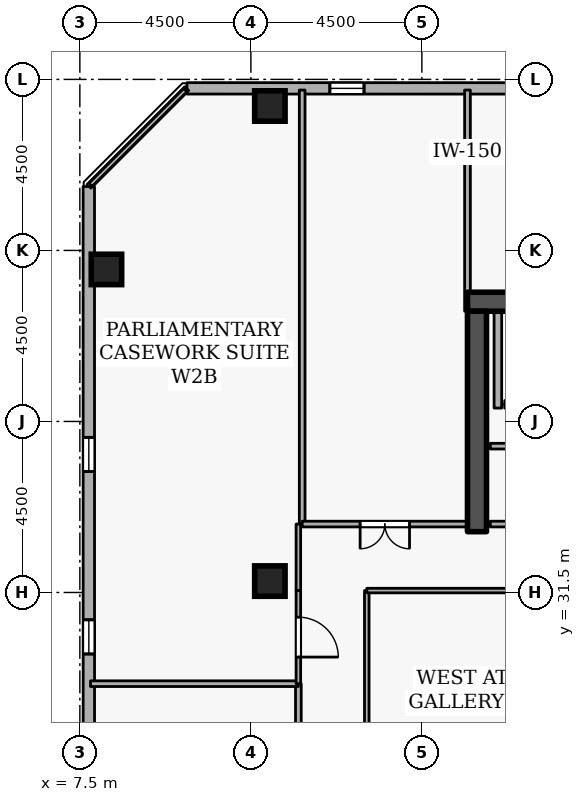
"""IFC4 building model, lengths in metres.
Left out: names, types, materials, properties, quantities, classifications, styles, units other than length and angle.
Written with IfcOpenShell. Run it as: python <this file> out.ifc"""

import sys

from ifc_helpers import new_model, si_unit, direction, frame, frame_2d, origin, origin_2d, place, context, subcontext, project, spatial, rectangle, extrude, element, fill, save


model = new_model("IFC4")
c1 = context("Model", 3, precision=1e-05, world=origin(), true_north=direction((0.0, 1.0)))
c2 = subcontext(c1, "Body", "Model", "MODEL_VIEW")
j1 = project(units=[si_unit("LENGTHUNIT", "METRE"), si_unit("PLANEANGLEUNIT", "RADIAN")], contexts=[c1])
p1 = place(None, origin())
s1 = spatial("IfcSite", under=j1, at=p1, CompositionType="ELEMENT")
p2 = place(p1, origin())
s2 = spatial("IfcBuilding", under=s1, at=p2, CompositionType="ELEMENT")
p3 = place(p2, frame((0.0, 0.0, 261.9)))
s3 = spatial("IfcBuildingStorey", under=s2, at=p3, CompositionType="ELEMENT", Elevation=261.9)
p4 = place(p3, frame((17.7, 39.15, 0.0), z_axis=(0.0, 0.0, 1.0), x_axis=(1.0, 0.0, 0.0)))
e1 = element("IfcWall", 1, at=p4, inside=s3, PredefinedType="SHEAR", context=c2, shape_type="SweptSolid", body=[
    extrude(rectangle(XDim=15.6, YDim=0.5, at=frame_2d((7.8, 0.0))), origin(), (0.0, 0.0, 1.0), 3.6),
])
p5 = place(p3, frame((17.95, 33.1, 0.0), z_axis=(0.0, 0.0, 1.0), x_axis=(0.0, 1.0, 0.0)))
e2 = element("IfcWall", 2, at=p5, inside=s3, PredefinedType="SHEAR", context=c2, shape_type="SweptSolid", body=[
    extrude(rectangle(XDim=5.8, YDim=0.5, at=frame_2d((2.9, 0.0))), origin(), (0.0, 0.0, 1.0), 3.6),
])
for number, where, z_axis, x_axis in (
    (3, (12.5, 44.3, 0.0), (0.0, 0.0, 1.0), (1.0, 0.0, 0.0)),
    (4, (8.2, 40.0, 0.0), (0.0, 0.0, 1.0), (1.0, 0.0, 0.0)),
    (5, (12.5, 31.8, 0.0), (0.0, 0.0, 1.0), (1.0, 0.0, 0.0)),
):
    element("IfcColumn", number, at=place(p3, frame(where, z_axis=z_axis, x_axis=x_axis)), inside=s3, PredefinedType="COLUMN", context=c2, shape_type="SweptSolid", body=[
        extrude(rectangle(XDim=0.8, YDim=0.8, at=origin_2d()), origin(), (0.0, 0.0, 1.0), 3.6),
    ])
p6 = place(p3, frame((45.578, 44.761, 0.0), z_axis=(0.0, 0.0, 1.0), x_axis=(-0.999999994606, 0.000103863011, 0.0)))
e6 = element("IfcWall", 6, at=p6, inside=s3, PredefinedType="STANDARD", context=c2, shape_type="SweptSolid", body=[
    extrude(rectangle(XDim=35.259, YDim=0.3, at=frame_2d((17.629, 0.0))), origin(), (0.0, 0.0, 1.0), 2.7),
])
p7 = place(p6, frame((1.8, 0.0, 0.72)))
e7 = element("IfcOpeningElement", 7, at=p7, cuts=e6, PredefinedType="OPENING", context=c2, shape_type="SweptSolid", body=[
    extrude(rectangle(XDim=0.9, YDim=1.75, at=frame_2d((0.45, 0.875))), frame((0.0, 0.16, 0.0), z_axis=(0.0, -1.0, 0.0), x_axis=(1.0, 0.0, 0.0)), (0.0, 0.0, 1.0), 0.32),
])
p8 = place(p6, frame((11.4, 0.0, 0.72)))
e8 = element("IfcOpeningElement", 8, at=p8, cuts=e6, PredefinedType="OPENING", context=c2, shape_type="SweptSolid", body=[
    extrude(rectangle(XDim=0.9, YDim=1.75, at=frame_2d((0.45, 0.875))), frame((0.0, 0.16, 0.0), z_axis=(0.0, -1.0, 0.0), x_axis=(1.0, 0.0, 0.0)), (0.0, 0.0, 1.0), 0.32),
])
p9 = place(p6, frame((16.2, 0.0, 0.72)))
e9 = element("IfcOpeningElement", 9, at=p9, cuts=e6, PredefinedType="OPENING", context=c2, shape_type="SweptSolid", body=[
    extrude(rectangle(XDim=0.9, YDim=1.75, at=frame_2d((0.45, 0.875))), frame((0.0, 0.16, 0.0), z_axis=(0.0, -1.0, 0.0), x_axis=(1.0, 0.0, 0.0)), (0.0, 0.0, 1.0), 0.32),
])
p10 = place(p6, frame((25.8, 0.0, 0.72)))
e10 = element("IfcOpeningElement", 10, at=p10, cuts=e6, PredefinedType="OPENING", context=c2, shape_type="SweptSolid", body=[
    extrude(rectangle(XDim=0.9, YDim=1.75, at=frame_2d((0.45, 0.875))), frame((0.0, 0.16, 0.0), z_axis=(0.0, -1.0, 0.0), x_axis=(1.0, 0.0, 0.0)), (0.0, 0.0, 1.0), 0.32),
])
p11 = place(p6, frame((30.6, 0.0, 0.72)))
e11 = element("IfcOpeningElement", 11, at=p11, cuts=e6, PredefinedType="OPENING", context=c2, shape_type="SweptSolid", body=[
    extrude(rectangle(XDim=0.9, YDim=1.75, at=frame_2d((0.45, 0.875))), frame((0.0, 0.16, 0.0), z_axis=(0.0, -1.0, 0.0), x_axis=(1.0, 0.0, 0.0)), (0.0, 0.0, 1.0), 0.32),
])
p12 = place(p3, frame((7.735, 42.181, 0.0), z_axis=(0.0, 0.0, 1.0), x_axis=(0.000103863011, -0.999999994606, 0.0)))
e12 = element("IfcWall", 12, at=p12, inside=s3, PredefinedType="STANDARD", context=c2, shape_type="SweptSolid", body=[
    extrude(rectangle(XDim=35.259, YDim=0.3, at=frame_2d((17.629, 0.0))), origin(), (0.0, 0.0, 1.0), 2.7),
])
p13 = place(p12, frame((6.6, 0.0, 0.72)))
e13 = element("IfcOpeningElement", 13, at=p13, cuts=e12, PredefinedType="OPENING", context=c2, shape_type="SweptSolid", body=[
    extrude(rectangle(XDim=0.9, YDim=1.75, at=frame_2d((0.45, 0.875))), frame((0.0, 0.16, 0.0), z_axis=(0.0, -1.0, 0.0), x_axis=(1.0, 0.0, 0.0)), (0.0, 0.0, 1.0), 0.32),
])
p14 = place(p12, frame((11.4, 0.0, 0.72)))
e14 = element("IfcOpeningElement", 14, at=p14, cuts=e12, PredefinedType="OPENING", context=c2, shape_type="SweptSolid", body=[
    extrude(rectangle(XDim=0.9, YDim=1.75, at=frame_2d((0.45, 0.875))), frame((0.0, 0.16, 0.0), z_axis=(0.0, -1.0, 0.0), x_axis=(1.0, 0.0, 0.0)), (0.0, 0.0, 1.0), 0.32),
])
p15 = place(p12, frame((21.0, 0.0, 0.72)))
e15 = element("IfcOpeningElement", 15, at=p15, cuts=e12, PredefinedType="OPENING", context=c2, shape_type="SweptSolid", body=[
    extrude(rectangle(XDim=0.9, YDim=1.75, at=frame_2d((0.45, 0.875))), frame((0.0, 0.16, 0.0), z_axis=(0.0, -1.0, 0.0), x_axis=(1.0, 0.0, 0.0)), (0.0, 0.0, 1.0), 0.32),
])
p16 = place(p12, frame((25.8, 0.0, 0.72)))
e16 = element("IfcOpeningElement", 16, at=p16, cuts=e12, PredefinedType="OPENING", context=c2, shape_type="SweptSolid", body=[
    extrude(rectangle(XDim=0.9, YDim=1.75, at=frame_2d((0.45, 0.875))), frame((0.0, 0.16, 0.0), z_axis=(0.0, -1.0, 0.0), x_axis=(1.0, 0.0, 0.0)), (0.0, 0.0, 1.0), 0.32),
])
p17 = place(p12, frame((30.6, 0.0, 0.72)))
e17 = element("IfcOpeningElement", 17, at=p17, cuts=e12, PredefinedType="OPENING", context=c2, shape_type="SweptSolid", body=[
    extrude(rectangle(XDim=0.9, YDim=1.75, at=frame_2d((0.45, 0.875))), frame((0.0, 0.16, 0.0), z_axis=(0.0, -1.0, 0.0), x_axis=(1.0, 0.0, 0.0)), (0.0, 0.0, 1.0), 0.32),
])
p18 = place(p3, frame((20.62, 36.45, 0.0), z_axis=(0.0, 0.0, 1.0), x_axis=(-1.0, 0.0, 0.0)))
e18 = element("IfcWall", 18, at=p18, inside=s3, PredefinedType="STANDARD", context=c2, shape_type="SweptSolid", body=[
    extrude(rectangle(XDim=1.94, YDim=0.2, at=frame_2d((0.97, 0.0))), origin(), (0.0, 0.0, 1.0), 3.34),
])
p19 = place(p18, frame((0.46, 0.0, 0.0)))
e19 = element("IfcOpeningElement", 19, at=p19, cuts=e18, PredefinedType="OPENING", context=c2, shape_type="SweptSolid", body=[
    extrude(rectangle(XDim=1.02, YDim=2.06, at=frame_2d((0.51, 1.03))), frame((0.0, 0.11, 0.0), z_axis=(0.0, -1.0, 0.0), x_axis=(1.0, 0.0, 0.0)), (0.0, 0.0, 1.0), 0.22),
])
p20 = place(p3, frame((18.5, 36.352, 0.0), z_axis=(0.0, 0.0, 1.0), x_axis=(0.0, 1.0, 0.0)))
e20 = element("IfcWall", 20, at=p20, inside=s3, PredefinedType="STANDARD", context=c2, shape_type="SweptSolid", body=[
    extrude(rectangle(XDim=2.536, YDim=0.2, at=frame_2d((1.268, 0.0))), origin(), (0.0, 0.0, 1.0), 3.34),
])
p21 = place(p3, frame((18.3, 33.3, 0.0), z_axis=(0.0, 0.0, 1.0), x_axis=(1.0, 0.0, 0.0)))
e21 = element("IfcWall", 21, at=p21, inside=s3, PredefinedType="PARTITIONING", context=c2, shape_type="SweptSolid", body=[
    extrude(rectangle(XDim=3.3, YDim=0.15, at=frame_2d((1.65, 0.0))), origin(), (0.0, 0.0, 1.0), 3.34),
])
p22 = place(p21, frame((1.19, 0.0, 0.0)))
e22 = element("IfcOpeningElement", 22, at=p22, cuts=e21, PredefinedType="OPENING", context=c2, shape_type="SweptSolid", body=[
    extrude(rectangle(XDim=0.92, YDim=2.08, at=frame_2d((0.46, 1.04))), frame((0.0, 0.085, 0.0), z_axis=(0.0, -1.0, 0.0), x_axis=(1.0, 0.0, 0.0)), (0.0, 0.0, 1.0), 0.17),
])
p23 = place(p3, frame((21.6, 35.35, 0.0), z_axis=(0.0, 0.0, 1.0), x_axis=(-1.0, 0.0, 0.0)))
e23 = element("IfcWall", 23, at=p23, inside=s3, PredefinedType="PARTITIONING", context=c2, shape_type="SweptSolid", body=[
    extrude(rectangle(XDim=3.3, YDim=0.15, at=frame_2d((1.65, 0.0))), origin(), (0.0, 0.0, 1.0), 3.34),
])
p24 = place(p3, frame((13.35, 33.3, 0.0), z_axis=(0.0, 0.0, 1.0), x_axis=(0.0, 1.0, 0.0)))
e24 = element("IfcWall", 24, at=p24, inside=s3, PredefinedType="PARTITIONING", context=c2, shape_type="SweptSolid", body=[
    extrude(rectangle(XDim=11.42, YDim=0.15, at=frame_2d((5.71, 0.0))), origin(), (0.0, 0.0, 1.0), 3.34),
])
p25 = place(p3, frame((17.7, 44.72, 0.0), z_axis=(0.0, 0.0, 1.0), x_axis=(0.0, -1.0, 0.0)))
e25 = element("IfcWall", 25, at=p25, inside=s3, PredefinedType="PARTITIONING", context=c2, shape_type="SweptSolid", body=[
    extrude(rectangle(XDim=5.82, YDim=0.15, at=frame_2d((2.91, 0.0))), origin(), (0.0, 0.0, 1.0), 2.545),
])
p26 = place(p3, frame((17.7, 33.3, 0.0), z_axis=(0.0, 0.0, 1.0), x_axis=(-1.0, 0.0, 0.0)))
e26 = element("IfcWall", 26, at=p26, inside=s3, PredefinedType="PARTITIONING", context=c2, shape_type="SweptSolid", body=[
    extrude(rectangle(XDim=4.35, YDim=0.15, at=frame_2d((2.175, 0.0))), origin(), (0.0, 0.0, 1.0), 3.34),
])
p27 = place(p26, frame((1.525, 0.0, 0.0)))
e27 = element("IfcOpeningElement", 27, at=p27, cuts=e26, PredefinedType="OPENING", context=c2, shape_type="SweptSolid", body=[
    extrude(rectangle(XDim=1.3, YDim=2.12, at=frame_2d((0.65, 1.06))), frame((0.0, 0.085, 0.0), z_axis=(0.0, -1.0, 0.0), x_axis=(1.0, 0.0, 0.0)), (0.0, 0.0, 1.0), 0.17),
])
p28 = place(p3, frame((13.25, 29.1, 0.0), z_axis=(0.0, 0.0, 1.0), x_axis=(0.0, -1.0, 0.0)))
e28 = element("IfcWall", 28, at=p28, inside=s3, PredefinedType="PARTITIONING", context=c2, shape_type="SweptSolid", body=[
    extrude(rectangle(XDim=4.2, YDim=0.15, at=frame_2d((2.1, 0.0))), origin(), (0.0, 0.0, 1.0), 3.34),
])
p29 = place(p28, frame((1.45, 0.0, 0.0)))
e29 = element("IfcOpeningElement", 29, at=p29, cuts=e28, PredefinedType="OPENING", context=c2, shape_type="SweptSolid", body=[
    extrude(rectangle(XDim=1.3, YDim=2.12, at=frame_2d((0.65, 1.06))), frame((0.0, 0.085, 0.0), z_axis=(0.0, -1.0, 0.0), x_axis=(1.0, 0.0, 0.0)), (0.0, 0.0, 1.0), 0.17),
])
p30 = place(p3, frame((7.78, 29.1, 0.0), z_axis=(0.0, 0.0, 1.0), x_axis=(1.0, 0.0, 0.0)))
e30 = element("IfcWall", 30, at=p30, inside=s3, PredefinedType="PARTITIONING", context=c2, shape_type="SweptSolid", body=[
    extrude(rectangle(XDim=5.47, YDim=0.15, at=frame_2d((2.735, 0.0))), origin(), (0.0, 0.0, 1.0), 3.34),
])
p31 = place(p3, frame((7.78, 42.225, 0.0), z_axis=(0.0, 0.0, 1.0), x_axis=(0.707106781187, 0.707106781187, 0.0)))
e31 = element("IfcWall", 31, at=p31, inside=s3, PredefinedType="PARTITIONING", context=c2, shape_type="SweptSolid", body=[
    extrude(rectangle(XDim=3.528, YDim=0.12, at=frame_2d((1.764, 0.0))), origin(), (0.0, 0.0, 1.0), 3.34),
])
p32 = place(p3, frame((13.25, 33.3, 0.0), z_axis=(0.0, 0.0, 1.0), x_axis=(0.0, -1.0, 0.0)))
e32 = element("IfcWall", 32, at=p32, inside=s3, PredefinedType="PARTITIONING", context=c2, shape_type="SweptSolid", body=[
    extrude(rectangle(XDim=1.75, YDim=0.12, at=frame_2d((0.875, 0.0))), origin(), (0.0, 0.0, 1.0), 3.34),
])
p33 = place(p3, frame((13.25, 31.55, 0.0), z_axis=(0.0, 0.0, 1.0), x_axis=(0.0, -1.0, 0.0)))
e33 = element("IfcWall", 33, at=p33, inside=s3, PredefinedType="PARTITIONING", context=c2, shape_type="SweptSolid", body=[
    extrude(rectangle(XDim=2.45, YDim=0.12, at=frame_2d((1.225, 0.0))), origin(), (0.0, 0.0, 1.0), 3.34),
])
p34 = place(p33, frame((0.7, 0.0, 0.0)))
e34 = element("IfcOpeningElement", 34, at=p34, cuts=e33, PredefinedType="OPENING", context=c2, shape_type="SweptSolid", body=[
    extrude(rectangle(XDim=1.05, YDim=2.1, at=frame_2d((0.525, 1.05))), frame((0.0, 0.07, 0.0), z_axis=(0.0, -1.0, 0.0), x_axis=(1.0, 0.0, 0.0)), (0.0, 0.0, 1.0), 0.14),
])
p35 = place(p3, frame((15.05, 22.45, 0.0), z_axis=(0.0, 0.0, 1.0), x_axis=(0.0, 1.0, 0.0)))
e35 = element("IfcWall", 35, at=p35, inside=s3, PredefinedType="PARTITIONING", context=c2, shape_type="SweptSolid", body=[
    extrude(rectangle(XDim=9.1, YDim=0.12, at=frame_2d((4.55, 0.0))), origin(), (0.0, 0.0, 1.0), 3.34),
])
p36 = place(p35, frame((4.075, 0.0, 0.0)))
e36 = element("IfcOpeningElement", 36, at=p36, cuts=e35, PredefinedType="OPENING", context=c2, shape_type="SweptSolid", body=[
    extrude(rectangle(XDim=0.95, YDim=2.1, at=frame_2d((0.475, 1.05))), frame((0.0, 0.07, 0.0), z_axis=(0.0, -1.0, 0.0), x_axis=(1.0, 0.0, 0.0)), (0.0, 0.0, 1.0), 0.14),
])
p37 = place(p3, frame((15.05, 31.55, 0.0), z_axis=(0.0, 0.0, 1.0), x_axis=(1.0, 0.0, 0.0)))
e37 = element("IfcWall", 37, at=p37, inside=s3, PredefinedType="PARTITIONING", context=c2, shape_type="SweptSolid", body=[
    extrude(rectangle(XDim=5.85, YDim=0.12, at=frame_2d((2.925, 0.0))), origin(), (0.0, 0.0, 1.0), 3.34),
])
p38 = place(p11, origin())
e38 = element("IfcWindow", 38, at=p38, inside=s3, PartitioningType="SINGLE_PANEL", PredefinedType="WINDOW", context=c2, shape_type="SweptSolid", body=[
    extrude(rectangle(XDim=0.9, YDim=1.75, at=frame_2d((0.45, 0.875))), frame((0.0, 0.03, 0.0), z_axis=(0.0, -1.0, 0.0), x_axis=(1.0, 0.0, 0.0)), (0.0, 0.0, 1.0), 0.06),
])
fill(e11, e38)
p39 = place(p13, origin())
e39 = element("IfcWindow", 39, at=p39, inside=s3, PartitioningType="SINGLE_PANEL", PredefinedType="WINDOW", context=c2, shape_type="SweptSolid", body=[
    extrude(rectangle(XDim=0.9, YDim=1.75, at=frame_2d((0.45, 0.875))), frame((0.0, 0.03, 0.0), z_axis=(0.0, -1.0, 0.0), x_axis=(1.0, 0.0, 0.0)), (0.0, 0.0, 1.0), 0.06),
])
fill(e13, e39)
p40 = place(p14, origin())
e40 = element("IfcWindow", 40, at=p40, inside=s3, PartitioningType="SINGLE_PANEL", PredefinedType="WINDOW", context=c2, shape_type="SweptSolid", body=[
    extrude(rectangle(XDim=0.9, YDim=1.75, at=frame_2d((0.45, 0.875))), frame((0.0, 0.03, 0.0), z_axis=(0.0, -1.0, 0.0), x_axis=(1.0, 0.0, 0.0)), (0.0, 0.0, 1.0), 0.06),
])
fill(e14, e40)
p41 = place(p27, origin())
e41 = element("IfcDoor", 41, at=p41, inside=s3, OperationType="DOUBLE_DOOR_SINGLE_SWING", PredefinedType="DOOR", context=c2, shape_type="SweptSolid", body=[
    extrude(rectangle(XDim=1.3, YDim=2.12, at=frame_2d((0.65, 1.06))), frame((0.0, 0.025, 0.0), z_axis=(0.0, -1.0, 0.0), x_axis=(1.0, 0.0, 0.0)), (0.0, 0.0, 1.0), 0.05),
])
fill(e27, e41)
p42 = place(p34, origin())
e42 = element("IfcDoor", 42, at=p42, inside=s3, OperationType="SINGLE_SWING_RIGHT", PredefinedType="DOOR", context=c2, shape_type="SweptSolid", body=[
    extrude(rectangle(XDim=1.05, YDim=2.1, at=frame_2d((0.525, 1.05))), frame((0.0, 0.025, 0.0), z_axis=(0.0, -1.0, 0.0), x_axis=(1.0, 0.0, 0.0)), (0.0, 0.0, 1.0), 0.05),
])
fill(e34, e42)
save(model, sys.argv[1])
